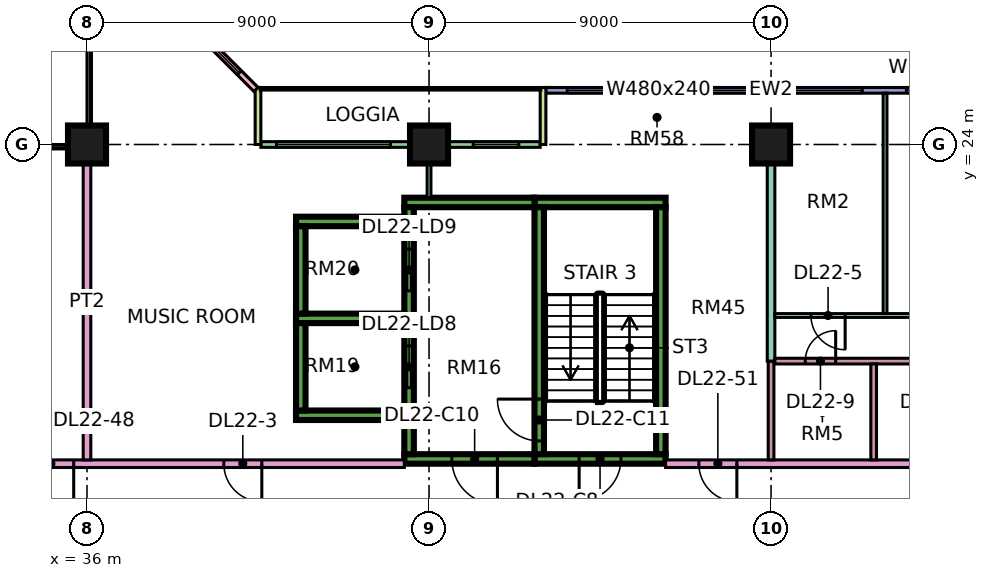
"""IFC4 building model, lengths in metres.
Left out: names, types, materials, properties, quantities, classifications, styles, units other than length and angle.
Written with IfcOpenShell. Run it as: python <this file> out.ifc"""

import sys

from ifc_helpers import new_model, si_unit, direction, frame, frame_2d, origin, origin_2d, place, context, subcontext, project, spatial, rectangle, extrude, element, fill, save


model = new_model("IFC4")
c1 = context("Model", 3, precision=1e-05, world=origin(), true_north=direction((0.0, 1.0)))
c2 = subcontext(c1, "Body", "Model", "MODEL_VIEW")
j1 = project(units=[si_unit("LENGTHUNIT", "METRE"), si_unit("PLANEANGLEUNIT", "RADIAN")], contexts=[c1])
p1 = place(None, origin())
s1 = spatial("IfcSite", under=j1, at=p1, CompositionType="ELEMENT")
p2 = place(p1, origin())
s2 = spatial("IfcBuilding", under=s1, at=p2, CompositionType="ELEMENT")
p3 = place(p2, frame((0.0, 0.0, 99.4)))
s3 = spatial("IfcBuildingStorey", under=s2, at=p3, CompositionType="ELEMENT", Elevation=99.4)
for number, where, z_axis, x_axis in (
    (1, (36.0, 24.0, 0.0), (0.0, 0.0, 1.0), (1.0, 0.0, 0.0)),
    (2, (45.0, 24.0, 0.0), (0.0, 0.0, 1.0), (1.0, 0.0, 0.0)),
    (3, (54.0, 24.0, 0.0), (0.0, 0.0, 1.0), (1.0, 0.0, 0.0)),
):
    element("IfcColumn", number, at=place(p3, frame(where, z_axis=z_axis, x_axis=x_axis)), inside=s3, PredefinedType="COLUMN", context=c2, shape_type="SweptSolid", body=[
        extrude(rectangle(XDim=1.0, YDim=1.0, at=origin_2d()), origin(), (0.0, 0.0, 1.0), 3.75),
    ])
p4 = place(p3, frame((47.775, 15.725, 0.0), z_axis=(0.0, 0.0, 1.0), x_axis=(1.0, 0.0, 0.0)))
e4 = element("IfcWall", 4, at=p4, inside=s3, PredefinedType="SHEAR", context=c2, shape_type="SweptSolid", body=[
    extrude(rectangle(XDim=3.45, YDim=0.25, at=frame_2d((1.725, 0.0))), origin(), (0.0, 0.0, 1.0), 3.75),
])
p5 = place(p4, frame((1.175, 0.0, 0.0)))
e5 = element("IfcOpeningElement", 5, at=p5, cuts=e4, PredefinedType="OPENING", context=c2, shape_type="SweptSolid", body=[
    extrude(rectangle(XDim=1.1, YDim=2.2, at=frame_2d((0.55, 1.1))), frame((0.0, 0.135, 0.0), z_axis=(0.0, -1.0, 0.0), x_axis=(1.0, 0.0, 0.0)), (0.0, 0.0, 1.0), 0.27),
])
p6 = place(p3, frame((47.775, 22.475, 0.0), z_axis=(0.0, 0.0, 1.0), x_axis=(1.0, 0.0, 0.0)))
e6 = element("IfcWall", 6, at=p6, inside=s3, PredefinedType="SHEAR", context=c2, shape_type="SweptSolid", body=[
    extrude(rectangle(XDim=3.45, YDim=0.25, at=frame_2d((1.725, 0.0))), origin(), (0.0, 0.0, 1.0), 3.75),
])
p7 = place(p3, frame((47.9, 15.85, 0.0), z_axis=(0.0, 0.0, 1.0), x_axis=(0.0, 1.0, 0.0)))
e7 = element("IfcWall", 7, at=p7, inside=s3, PredefinedType="SHEAR", context=c2, shape_type="SweptSolid", body=[
    extrude(rectangle(XDim=6.5, YDim=0.25, at=frame_2d((3.25, 0.0))), origin(), (0.0, 0.0, 1.0), 3.75),
])
p8 = place(p7, frame((0.35, 0.0, 0.0)))
e8 = element("IfcOpeningElement", 8, at=p8, cuts=e7, PredefinedType="OPENING", context=c2, shape_type="SweptSolid", body=[
    extrude(rectangle(XDim=1.1, YDim=2.2, at=frame_2d((0.55, 1.1))), frame((0.0, 0.135, 0.0), z_axis=(0.0, -1.0, 0.0), x_axis=(1.0, 0.0, 0.0)), (0.0, 0.0, 1.0), 0.27),
])
p9 = place(p3, frame((51.1, 15.85, 0.0), z_axis=(0.0, 0.0, 1.0), x_axis=(0.0, 1.0, 0.0)))
e9 = element("IfcWall", 9, at=p9, inside=s3, PredefinedType="SHEAR", context=c2, shape_type="SweptSolid", body=[
    extrude(rectangle(XDim=6.5, YDim=0.25, at=frame_2d((3.25, 0.0))), origin(), (0.0, 0.0, 1.0), 3.75),
])
p10 = place(p3, frame((44.35, 15.725, 0.0), z_axis=(0.0, 0.0, 1.0), x_axis=(1.0, 0.0, 0.0)))
e10 = element("IfcWall", 10, at=p10, inside=s3, PredefinedType="SHEAR", context=c2, shape_type="SweptSolid", body=[
    extrude(rectangle(XDim=3.425, YDim=0.25, at=frame_2d((1.712, 0.0))), origin(), (0.0, 0.0, 1.0), 3.75),
])
p11 = place(p10, frame((1.25, 0.0, 0.0)))
e11 = element("IfcOpeningElement", 11, at=p11, cuts=e10, PredefinedType="OPENING", context=c2, shape_type="SweptSolid", body=[
    extrude(rectangle(XDim=1.2, YDim=2.2, at=frame_2d((0.6, 1.1))), frame((0.0, 0.135, 0.0), z_axis=(0.0, -1.0, 0.0), x_axis=(1.0, 0.0, 0.0)), (0.0, 0.0, 1.0), 0.27),
])
p12 = place(p3, frame((44.35, 22.475, 0.0), z_axis=(0.0, 0.0, 1.0), x_axis=(1.0, 0.0, 0.0)))
e12 = element("IfcWall", 12, at=p12, inside=s3, PredefinedType="SHEAR", context=c2, shape_type="SweptSolid", body=[
    extrude(rectangle(XDim=3.425, YDim=0.25, at=frame_2d((1.712, 0.0))), origin(), (0.0, 0.0, 1.0), 3.75),
])
p13 = place(p3, frame((44.475, 15.85, 0.0), z_axis=(0.0, 0.0, 1.0), x_axis=(0.0, 1.0, 0.0)))
e13 = element("IfcWall", 13, at=p13, inside=s3, PredefinedType="SHEAR", context=c2, shape_type="SweptSolid", body=[
    extrude(rectangle(XDim=6.5, YDim=0.25, at=frame_2d((3.25, 0.0))), origin(), (0.0, 0.0, 1.0), 3.75),
])
p14 = place(p13, frame((1.75, 0.0, 0.0)))
e14 = element("IfcOpeningElement", 14, at=p14, cuts=e13, PredefinedType="OPENING", context=c2, shape_type="SweptSolid", body=[
    extrude(rectangle(XDim=1.1, YDim=2.2, at=frame_2d((0.55, 1.1))), frame((0.0, 0.135, 0.0), z_axis=(0.0, -1.0, 0.0), x_axis=(1.0, 0.0, 0.0)), (0.0, 0.0, 1.0), 0.27),
])
p15 = place(p13, frame((4.3, 0.0, 0.0)))
e15 = element("IfcOpeningElement", 15, at=p15, cuts=e13, PredefinedType="OPENING", context=c2, shape_type="SweptSolid", body=[
    extrude(rectangle(XDim=1.1, YDim=2.2, at=frame_2d((0.55, 1.1))), frame((0.0, 0.135, 0.0), z_axis=(0.0, -1.0, 0.0), x_axis=(1.0, 0.0, 0.0)), (0.0, 0.0, 1.0), 0.27),
])
for number, where, z_axis, x_axis in (
    (16, (41.5, 16.875, 0.0), (0.0, 0.0, 1.0), (1.0, 0.0, 0.0)),
    (17, (41.5, 19.425, 0.0), (0.0, 0.0, 1.0), (1.0, 0.0, 0.0)),
    (18, (41.5, 21.975, 0.0), (0.0, 0.0, 1.0), (1.0, 0.0, 0.0)),
):
    element("IfcWall", number, at=place(p3, frame(where, z_axis=z_axis, x_axis=x_axis)), inside=s3, PredefinedType="SHEAR", context=c2, shape_type="SweptSolid", body=[
        extrude(rectangle(XDim=2.85, YDim=0.25, at=frame_2d((1.425, 0.0))), origin(), (0.0, 0.0, 1.0), 3.75),
    ])
for number, where, z_axis, x_axis in (
    (19, (41.625, 17.0, 0.0), (0.0, 0.0, 1.0), (0.0, 1.0, 0.0)),
    (20, (41.625, 19.55, 0.0), (0.0, 0.0, 1.0), (0.0, 1.0, 0.0)),
):
    element("IfcWall", number, at=place(p3, frame(where, z_axis=z_axis, x_axis=x_axis)), inside=s3, PredefinedType="SHEAR", context=c2, shape_type="SweptSolid", body=[
        extrude(rectangle(XDim=2.3, YDim=0.25, at=frame_2d((1.15, 0.0))), origin(), (0.0, 0.0, 1.0), 3.75),
    ])
p16 = place(p3, frame((59.925, 25.425, 0.0), z_axis=(0.0, 0.0, 1.0), x_axis=(-1.0, 0.0, 0.0)))
e21 = element("IfcWall", 21, at=p16, inside=s3, PredefinedType="SOLIDWALL", context=c2, shape_type="SweptSolid", body=[
    extrude(rectangle(XDim=11.85, YDim=0.15, at=frame_2d((5.925, 0.0))), origin(), (0.0, 0.0, 1.0), 3.35),
])
p17 = place(p16, frame((0.562, 0.0, 0.45)))
e22 = element("IfcOpeningElement", 22, at=p17, cuts=e21, PredefinedType="OPENING", context=c2, shape_type="SweptSolid", body=[
    extrude(rectangle(XDim=1.8, YDim=2.4, at=frame_2d((0.9, 1.2))), frame((0.0, 0.085, 0.0), z_axis=(0.0, -1.0, 0.0), x_axis=(1.0, 0.0, 0.0)), (0.0, 0.0, 1.0), 0.17),
])
p18 = place(p16, frame((3.525, 0.0, 0.45)))
e23 = element("IfcOpeningElement", 23, at=p18, cuts=e21, PredefinedType="OPENING", context=c2, shape_type="SweptSolid", body=[
    extrude(rectangle(XDim=1.8, YDim=2.4, at=frame_2d((0.9, 1.2))), frame((0.0, 0.085, 0.0), z_axis=(0.0, -1.0, 0.0), x_axis=(1.0, 0.0, 0.0)), (0.0, 0.0, 1.0), 0.17),
])
p19 = place(p16, frame((6.488, 0.0, 0.45)))
e24 = element("IfcOpeningElement", 24, at=p19, cuts=e21, PredefinedType="OPENING", context=c2, shape_type="SweptSolid", body=[
    extrude(rectangle(XDim=4.8, YDim=2.4, at=frame_2d((2.4, 1.2))), frame((0.0, 0.085, 0.0), z_axis=(0.0, -1.0, 0.0), x_axis=(1.0, 0.0, 0.0)), (0.0, 0.0, 1.0), 0.17),
])
p20 = place(p3, frame((47.925, 24.0, 0.0), z_axis=(0.0, 0.0, 1.0), x_axis=(-1.0, 0.0, 0.0)))
e25 = element("IfcWall", 25, at=p20, inside=s3, PredefinedType="SOLIDWALL", context=c2, shape_type="SweptSolid", body=[
    extrude(rectangle(XDim=7.35, YDim=0.15, at=frame_2d((3.675, 0.0))), origin(), (0.0, 0.0, 1.0), 3.35),
])
p21 = place(p20, frame((0.562, 0.0, 0.45)))
e26 = element("IfcOpeningElement", 26, at=p21, cuts=e25, PredefinedType="OPENING", context=c2, shape_type="SweptSolid", body=[
    extrude(rectangle(XDim=1.2, YDim=2.4, at=frame_2d((0.6, 1.2))), frame((0.0, 0.085, 0.0), z_axis=(0.0, -1.0, 0.0), x_axis=(1.0, 0.0, 0.0)), (0.0, 0.0, 1.0), 0.17),
])
p22 = place(p20, frame((3.938, 0.0, 0.45)))
e27 = element("IfcOpeningElement", 27, at=p22, cuts=e25, PredefinedType="OPENING", context=c2, shape_type="SweptSolid", body=[
    extrude(rectangle(XDim=3.0, YDim=2.4, at=frame_2d((1.5, 1.2))), frame((0.0, 0.085, 0.0), z_axis=(0.0, -1.0, 0.0), x_axis=(1.0, 0.0, 0.0)), (0.0, 0.0, 1.0), 0.17),
])
for number, where, z_axis, x_axis in (
    (28, (48.0, 25.5, 0.0), (0.0, 0.0, 1.0), (0.0, -1.0, 0.0)),
    (29, (40.5, 25.5, 0.0), (0.0, 0.0, 1.0), (0.0, -1.0, 0.0)),
):
    element("IfcWall", number, at=place(p3, frame(where, z_axis=z_axis, x_axis=x_axis)), inside=s3, PredefinedType="SOLIDWALL", context=c2, shape_type="SweptSolid", body=[
        extrude(rectangle(XDim=1.5, YDim=0.15, at=frame_2d((0.75, 0.0))), origin(), (0.0, 0.0, 1.0), 3.35),
    ])
p23 = place(p3, frame((40.447, 25.447, 0.0), z_axis=(0.0, 0.0, 1.0), x_axis=(-0.707106781187, 0.707106781187, 0.0)))
e30 = element("IfcWall", 30, at=p23, inside=s3, PredefinedType="SOLIDWALL", context=c2, shape_type="SweptSolid", body=[
    extrude(rectangle(XDim=4.243, YDim=0.15, at=frame_2d((2.121, 0.0))), origin(), (0.0, 0.0, 1.0), 3.35),
])
p24 = place(p23, frame((0.621, 0.0, 0.45)))
e31 = element("IfcOpeningElement", 31, at=p24, cuts=e30, PredefinedType="OPENING", context=c2, shape_type="SweptSolid", body=[
    extrude(rectangle(XDim=3.0, YDim=2.4, at=frame_2d((1.5, 1.2))), frame((0.0, 0.085, 0.0), z_axis=(0.0, -1.0, 0.0), x_axis=(1.0, 0.0, 0.0)), (0.0, 0.0, 1.0), 0.17),
])
p25 = place(p3, frame((34.0, 15.6, 0.0), z_axis=(0.0, 0.0, 1.0), x_axis=(1.0, 0.0, 0.0)))
e32 = element("IfcWall", 32, at=p25, inside=s3, PredefinedType="PARTITIONING", context=c2, shape_type="SweptSolid", body=[
    extrude(rectangle(XDim=10.35, YDim=0.2, at=frame_2d((5.175, 0.0))), origin(), (0.0, 0.0, 1.0), 3.35),
])
p26 = place(p25, frame((5.6, 0.0, 0.0)))
e33 = element("IfcOpeningElement", 33, at=p26, cuts=e32, PredefinedType="OPENING", context=c2, shape_type="SweptSolid", body=[
    extrude(rectangle(XDim=1.0, YDim=2.1, at=frame_2d((0.5, 1.05))), frame((0.0, 0.11, 0.0), z_axis=(0.0, -1.0, 0.0), x_axis=(1.0, 0.0, 0.0)), (0.0, 0.0, 1.0), 0.22),
])
p27 = place(p25, frame((0.45, 0.0, 0.0)))
e34 = element("IfcOpeningElement", 34, at=p27, cuts=e32, PredefinedType="OPENING", context=c2, shape_type="SweptSolid", body=[
    extrude(rectangle(XDim=1.2, YDim=2.1, at=frame_2d((0.6, 1.05))), frame((0.0, 0.11, 0.0), z_axis=(0.0, -1.0, 0.0), x_axis=(1.0, 0.0, 0.0)), (0.0, 0.0, 1.0), 0.22),
])
p28 = place(p3, frame((36.0, 15.7, 0.0), z_axis=(0.0, 0.0, 1.0), x_axis=(0.0, 1.0, 0.0)))
e35 = element("IfcWall", 35, at=p28, inside=s3, PredefinedType="PARTITIONING", context=c2, shape_type="SweptSolid", body=[
    extrude(rectangle(XDim=8.3, YDim=0.2, at=frame_2d((4.15, 0.0))), origin(), (0.0, 0.0, 1.0), 3.35),
])
p29 = place(p3, frame((45.0, 22.6, 0.0), z_axis=(0.0, 0.0, 1.0), x_axis=(0.0, 1.0, 0.0)))
e36 = element("IfcWall", 36, at=p29, inside=s3, PredefinedType="PARTITIONING", context=c2, shape_type="SweptSolid", body=[
    extrude(rectangle(XDim=1.326, YDim=0.1, at=frame_2d((0.663, 0.0))), origin(), (0.0, 0.0, 1.0), 3.35),
])
p30 = place(p3, frame((51.225, 15.6, 0.0), z_axis=(0.0, 0.0, 1.0), x_axis=(1.0, 0.0, 0.0)))
e37 = element("IfcWall", 37, at=p30, inside=s3, PredefinedType="PARTITIONING", context=c2, shape_type="SweptSolid", body=[
    extrude(rectangle(XDim=20.701, YDim=0.2, at=frame_2d((10.351, 0.0))), origin(), (0.0, 0.0, 1.0), 3.35),
])
p31 = place(p30, frame((18.425, 0.0, 0.0)))
e38 = element("IfcOpeningElement", 38, at=p31, cuts=e37, PredefinedType="OPENING", context=c2, shape_type="SweptSolid", body=[
    extrude(rectangle(XDim=1.0, YDim=2.1, at=frame_2d((0.5, 1.05))), frame((0.0, 0.11, 0.0), z_axis=(0.0, -1.0, 0.0), x_axis=(1.0, 0.0, 0.0)), (0.0, 0.0, 1.0), 0.22),
])
p32 = place(p30, frame((0.875, 0.0, 0.0)))
e39 = element("IfcOpeningElement", 39, at=p32, cuts=e37, PredefinedType="OPENING", context=c2, shape_type="SweptSolid", body=[
    extrude(rectangle(XDim=1.0, YDim=2.1, at=frame_2d((0.5, 1.05))), frame((0.0, 0.11, 0.0), z_axis=(0.0, -1.0, 0.0), x_axis=(1.0, 0.0, 0.0)), (0.0, 0.0, 1.0), 0.22),
])
p33 = place(p3, frame((54.0, 15.7, 0.0), z_axis=(0.0, 0.0, 1.0), x_axis=(0.0, 1.0, 0.0)))
e40 = element("IfcWall", 40, at=p33, inside=s3, PredefinedType="PARTITIONING", context=c2, shape_type="SweptSolid", body=[
    extrude(rectangle(XDim=2.6, YDim=0.15, at=frame_2d((1.3, 0.0))), origin(), (0.0, 0.0, 1.0), 3.35),
])
p34 = place(p3, frame((54.0, 18.3, 0.0), z_axis=(0.0, 0.0, 1.0), x_axis=(0.0, 1.0, 0.0)))
e41 = element("IfcWall", 41, at=p34, inside=s3, PredefinedType="PARTITIONING", context=c2, shape_type="SweptSolid", body=[
    extrude(rectangle(XDim=5.7, YDim=0.2, at=frame_2d((2.85, 0.0))), origin(), (0.0, 0.0, 1.0), 3.35),
])
p35 = place(p3, frame((54.1, 18.3, 0.0), z_axis=(0.0, 0.0, 1.0), x_axis=(1.0, 0.0, 0.0)))
e42 = element("IfcWall", 42, at=p35, inside=s3, PredefinedType="PARTITIONING", context=c2, shape_type="SweptSolid", body=[
    extrude(rectangle(XDim=14.375, YDim=0.15, at=frame_2d((7.188, 0.0))), origin(), (0.0, 0.0, 1.0), 3.35),
])
p36 = place(p35, frame((3.8, 0.0, 0.0)))
e43 = element("IfcOpeningElement", 43, at=p36, cuts=e42, PredefinedType="OPENING", context=c2, shape_type="SweptSolid", body=[
    extrude(rectangle(XDim=0.8, YDim=2.1, at=frame_2d((0.4, 1.05))), frame((0.0, 0.085, 0.0), z_axis=(0.0, -1.0, 0.0), x_axis=(1.0, 0.0, 0.0)), (0.0, 0.0, 1.0), 0.17),
])
p37 = place(p35, frame((10.4, 0.0, 0.0)))
e44 = element("IfcOpeningElement", 44, at=p37, cuts=e42, PredefinedType="OPENING", context=c2, shape_type="SweptSolid", body=[
    extrude(rectangle(XDim=0.9, YDim=2.1, at=frame_2d((0.45, 1.05))), frame((0.0, 0.085, 0.0), z_axis=(0.0, -1.0, 0.0), x_axis=(1.0, 0.0, 0.0)), (0.0, 0.0, 1.0), 0.17),
])
p38 = place(p35, frame((0.8, 0.0, 0.0)))
e45 = element("IfcOpeningElement", 45, at=p38, cuts=e42, PredefinedType="OPENING", context=c2, shape_type="SweptSolid", body=[
    extrude(rectangle(XDim=0.8, YDim=2.1, at=frame_2d((0.4, 1.05))), frame((0.0, 0.085, 0.0), z_axis=(0.0, -1.0, 0.0), x_axis=(1.0, 0.0, 0.0)), (0.0, 0.0, 1.0), 0.17),
])
p39 = place(p35, frame((7.1, 0.0, 0.0)))
e46 = element("IfcOpeningElement", 46, at=p39, cuts=e42, PredefinedType="OPENING", context=c2, shape_type="SweptSolid", body=[
    extrude(rectangle(XDim=0.8, YDim=2.1, at=frame_2d((0.4, 1.05))), frame((0.0, 0.085, 0.0), z_axis=(0.0, -1.0, 0.0), x_axis=(1.0, 0.0, 0.0)), (0.0, 0.0, 1.0), 0.17),
])
p40 = place(p3, frame((54.1, 19.5, 0.0), z_axis=(0.0, 0.0, 1.0), x_axis=(1.0, 0.0, 0.0)))
e47 = element("IfcWall", 47, at=p40, inside=s3, PredefinedType="PARTITIONING", context=c2, shape_type="SweptSolid", body=[
    extrude(rectangle(XDim=5.95, YDim=0.1, at=frame_2d((2.975, 0.0))), origin(), (0.0, 0.0, 1.0), 3.35),
])
p41 = place(p40, frame((0.95, 0.0, 0.0)))
e48 = element("IfcOpeningElement", 48, at=p41, cuts=e47, PredefinedType="OPENING", context=c2, shape_type="SweptSolid", body=[
    extrude(rectangle(XDim=0.9, YDim=2.1, at=frame_2d((0.45, 1.05))), frame((0.0, 0.06, 0.0), z_axis=(0.0, -1.0, 0.0), x_axis=(1.0, 0.0, 0.0)), (0.0, 0.0, 1.0), 0.12),
])
p42 = place(p40, frame((3.95, 0.0, 0.0)))
e49 = element("IfcOpeningElement", 49, at=p42, cuts=e47, PredefinedType="OPENING", context=c2, shape_type="SweptSolid", body=[
    extrude(rectangle(XDim=0.9, YDim=2.1, at=frame_2d((0.45, 1.05))), frame((0.0, 0.06, 0.0), z_axis=(0.0, -1.0, 0.0), x_axis=(1.0, 0.0, 0.0)), (0.0, 0.0, 1.0), 0.12),
])
p43 = place(p3, frame((56.7, 15.7, 0.0), z_axis=(0.0, 0.0, 1.0), x_axis=(0.0, 1.0, 0.0)))
e50 = element("IfcWall", 50, at=p43, inside=s3, PredefinedType="PARTITIONING", context=c2, shape_type="SweptSolid", body=[
    extrude(rectangle(XDim=2.525, YDim=0.15, at=frame_2d((1.263, 0.0))), origin(), (0.0, 0.0, 1.0), 3.35),
])
p44 = place(p3, frame((57.0, 19.55, 0.0), z_axis=(0.0, 0.0, 1.0), x_axis=(0.0, 1.0, 0.0)))
e51 = element("IfcWall", 51, at=p44, inside=s3, PredefinedType="PARTITIONING", context=c2, shape_type="SweptSolid", body=[
    extrude(rectangle(XDim=5.801, YDim=0.1, at=frame_2d((2.9, 0.0))), origin(), (0.0, 0.0, 1.0), 3.35),
])
p45 = place(p17, origin())
e52 = element("IfcWindow", 52, at=p45, inside=s3, PartitioningType="SINGLE_PANEL", PredefinedType="WINDOW", context=c2, shape_type="SweptSolid", body=[
    extrude(rectangle(XDim=1.8, YDim=2.4, at=frame_2d((0.9, 1.2))), frame((0.0, 0.03, 0.0), z_axis=(0.0, -1.0, 0.0), x_axis=(1.0, 0.0, 0.0)), (0.0, 0.0, 1.0), 0.06),
])
fill(e22, e52)
p46 = place(p18, origin())
e53 = element("IfcWindow", 53, at=p46, inside=s3, PartitioningType="SINGLE_PANEL", PredefinedType="WINDOW", context=c2, shape_type="SweptSolid", body=[
    extrude(rectangle(XDim=1.8, YDim=2.4, at=frame_2d((0.9, 1.2))), frame((0.0, 0.03, 0.0), z_axis=(0.0, -1.0, 0.0), x_axis=(1.0, 0.0, 0.0)), (0.0, 0.0, 1.0), 0.06),
])
fill(e23, e53)
p47 = place(p19, origin())
e54 = element("IfcWindow", 54, at=p47, inside=s3, PartitioningType="SINGLE_PANEL", PredefinedType="WINDOW", context=c2, shape_type="SweptSolid", body=[
    extrude(rectangle(XDim=4.8, YDim=2.4, at=frame_2d((2.4, 1.2))), frame((0.0, 0.03, 0.0), z_axis=(0.0, -1.0, 0.0), x_axis=(1.0, 0.0, 0.0)), (0.0, 0.0, 1.0), 0.06),
])
fill(e24, e54)
p48 = place(p21, origin())
e55 = element("IfcWindow", 55, at=p48, inside=s3, PartitioningType="SINGLE_PANEL", PredefinedType="WINDOW", context=c2, shape_type="SweptSolid", body=[
    extrude(rectangle(XDim=1.2, YDim=2.4, at=frame_2d((0.6, 1.2))), frame((0.0, 0.03, 0.0), z_axis=(0.0, -1.0, 0.0), x_axis=(1.0, 0.0, 0.0)), (0.0, 0.0, 1.0), 0.06),
])
fill(e26, e55)
p49 = place(p22, origin())
e56 = element("IfcWindow", 56, at=p49, inside=s3, PartitioningType="SINGLE_PANEL", PredefinedType="WINDOW", context=c2, shape_type="SweptSolid", body=[
    extrude(rectangle(XDim=3.0, YDim=2.4, at=frame_2d((1.5, 1.2))), frame((0.0, 0.03, 0.0), z_axis=(0.0, -1.0, 0.0), x_axis=(1.0, 0.0, 0.0)), (0.0, 0.0, 1.0), 0.06),
])
fill(e27, e56)
p50 = place(p24, origin())
e57 = element("IfcWindow", 57, at=p50, inside=s3, PartitioningType="SINGLE_PANEL", PredefinedType="WINDOW", context=c2, shape_type="SweptSolid", body=[
    extrude(rectangle(XDim=3.0, YDim=2.4, at=frame_2d((1.5, 1.2))), frame((0.0, 0.03, 0.0), z_axis=(0.0, -1.0, 0.0), x_axis=(1.0, 0.0, 0.0)), (0.0, 0.0, 1.0), 0.06),
])
fill(e31, e57)
p51 = place(p5, frame((1.1, 0.0, 0.0), z_axis=(0.0, 0.0, 1.0), x_axis=(-1.0, 0.0, 0.0)))
e58 = element("IfcDoor", 58, at=p51, inside=s3, OperationType="SINGLE_SWING_LEFT", PredefinedType="DOOR", context=c2, shape_type="SweptSolid", body=[
    extrude(rectangle(XDim=1.1, YDim=2.2, at=frame_2d((0.55, 1.1))), frame((0.0, 0.025, 0.0), z_axis=(0.0, -1.0, 0.0), x_axis=(1.0, 0.0, 0.0)), (0.0, 0.0, 1.0), 0.05),
])
fill(e5, e58)
p52 = place(p11, origin())
e59 = element("IfcDoor", 59, at=p52, inside=s3, OperationType="SINGLE_SWING_RIGHT", PredefinedType="DOOR", context=c2, shape_type="SweptSolid", body=[
    extrude(rectangle(XDim=1.2, YDim=2.2, at=frame_2d((0.6, 1.1))), frame((0.0, 0.025, 0.0), z_axis=(0.0, -1.0, 0.0), x_axis=(1.0, 0.0, 0.0)), (0.0, 0.0, 1.0), 0.05),
])
fill(e11, e59)
p53 = place(p8, frame((1.1, 0.0, 0.0), z_axis=(0.0, 0.0, 1.0), x_axis=(-1.0, 0.0, 0.0)))
e60 = element("IfcDoor", 60, at=p53, inside=s3, OperationType="SINGLE_SWING_RIGHT", PredefinedType="DOOR", context=c2, shape_type="SweptSolid", body=[
    extrude(rectangle(XDim=1.1, YDim=2.2, at=frame_2d((0.55, 1.1))), frame((0.0, 0.025, 0.0), z_axis=(0.0, -1.0, 0.0), x_axis=(1.0, 0.0, 0.0)), (0.0, 0.0, 1.0), 0.05),
])
fill(e8, e60)
p54 = place(p14, origin())
e61 = element("IfcDoor", 61, at=p54, inside=s3, OperationType="DOUBLE_DOOR_SLIDING", PredefinedType="DOOR", context=c2, shape_type="SweptSolid", body=[
    extrude(rectangle(XDim=1.1, YDim=2.2, at=frame_2d((0.55, 1.1))), frame((0.0, 0.025, 0.0), z_axis=(0.0, -1.0, 0.0), x_axis=(1.0, 0.0, 0.0)), (0.0, 0.0, 1.0), 0.05),
])
fill(e14, e61)
p55 = place(p15, origin())
e62 = element("IfcDoor", 62, at=p55, inside=s3, OperationType="DOUBLE_DOOR_SLIDING", PredefinedType="DOOR", context=c2, shape_type="SweptSolid", body=[
    extrude(rectangle(XDim=1.1, YDim=2.2, at=frame_2d((0.55, 1.1))), frame((0.0, 0.025, 0.0), z_axis=(0.0, -1.0, 0.0), x_axis=(1.0, 0.0, 0.0)), (0.0, 0.0, 1.0), 0.05),
])
fill(e15, e62)
p56 = place(p26, origin())
e63 = element("IfcDoor", 63, at=p56, inside=s3, OperationType="SINGLE_SWING_RIGHT", PredefinedType="DOOR", context=c2, shape_type="SweptSolid", body=[
    extrude(rectangle(XDim=1.0, YDim=2.1, at=frame_2d((0.5, 1.05))), frame((0.0, 0.025, 0.0), z_axis=(0.0, -1.0, 0.0), x_axis=(1.0, 0.0, 0.0)), (0.0, 0.0, 1.0), 0.05),
])
fill(e33, e63)
p57 = place(p41, origin())
e64 = element("IfcDoor", 64, at=p57, inside=s3, OperationType="SINGLE_SWING_RIGHT", PredefinedType="DOOR", context=c2, shape_type="SweptSolid", body=[
    extrude(rectangle(XDim=0.9, YDim=2.1, at=frame_2d((0.45, 1.05))), frame((0.0, 0.025, 0.0), z_axis=(0.0, -1.0, 0.0), x_axis=(1.0, 0.0, 0.0)), (0.0, 0.0, 1.0), 0.05),
])
fill(e48, e64)
p58 = place(p38, frame((0.8, 0.0, 0.0), z_axis=(0.0, 0.0, 1.0), x_axis=(-1.0, 0.0, 0.0)))
e65 = element("IfcDoor", 65, at=p58, inside=s3, OperationType="SINGLE_SWING_RIGHT", PredefinedType="DOOR", context=c2, shape_type="SweptSolid", body=[
    extrude(rectangle(XDim=0.8, YDim=2.1, at=frame_2d((0.4, 1.05))), frame((0.0, 0.025, 0.0), z_axis=(0.0, -1.0, 0.0), x_axis=(1.0, 0.0, 0.0)), (0.0, 0.0, 1.0), 0.05),
])
fill(e45, e65)
p59 = place(p27, origin())
e66 = element("IfcDoor", 66, at=p59, inside=s3, OperationType="SINGLE_SWING_RIGHT", PredefinedType="DOOR", context=c2, shape_type="SweptSolid", body=[
    extrude(rectangle(XDim=1.2, YDim=2.1, at=frame_2d((0.6, 1.05))), frame((0.0, 0.025, 0.0), z_axis=(0.0, -1.0, 0.0), x_axis=(1.0, 0.0, 0.0)), (0.0, 0.0, 1.0), 0.05),
])
fill(e34, e66)
p60 = place(p32, origin())
e67 = element("IfcDoor", 67, at=p60, inside=s3, OperationType="SINGLE_SWING_RIGHT", PredefinedType="DOOR", context=c2, shape_type="SweptSolid", body=[
    extrude(rectangle(XDim=1.0, YDim=2.1, at=frame_2d((0.5, 1.05))), frame((0.0, 0.025, 0.0), z_axis=(0.0, -1.0, 0.0), x_axis=(1.0, 0.0, 0.0)), (0.0, 0.0, 1.0), 0.05),
])
fill(e39, e67)
save(model, sys.argv[1])
